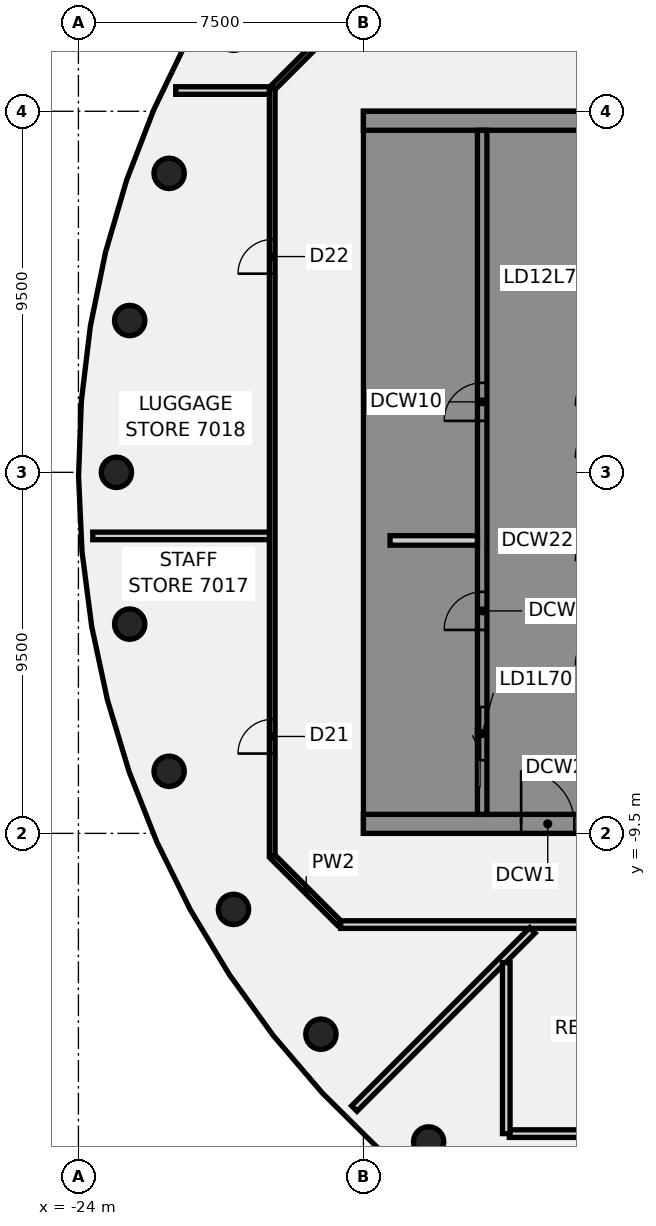
"""IFC4 building model, lengths in metres.
Left out: names, types, materials, properties, quantities, classifications, styles, units other than length and angle.
Written with IfcOpenShell. Run it as: python <this file> out.ifc"""

import sys

from ifc_helpers import new_model, si_unit, direction, frame, frame_2d, origin, origin_2d, place, context, subcontext, project, spatial, polyline, rectangle, circle, outline, extrude, element, fill, save


model = new_model("IFC4")
c1 = context("Model", 3, precision=1e-05, world=origin(), true_north=direction((0.0, 1.0)))
c2 = subcontext(c1, "Body", "Model", "MODEL_VIEW")
j1 = project(units=[si_unit("LENGTHUNIT", "METRE"), si_unit("PLANEANGLEUNIT", "RADIAN")], contexts=[c1])
p1 = place(None, origin())
s1 = spatial("IfcSite", under=j1, at=p1, CompositionType="ELEMENT")
p2 = place(p1, origin())
s2 = spatial("IfcBuilding", under=s1, at=p2, CompositionType="ELEMENT")
p3 = place(p2, frame((0.0, 0.0, 274.8)))
s3 = spatial("IfcBuildingStorey", under=s2, at=p3, CompositionType="ELEMENT", Elevation=274.8)
for number, where, z_axis, x_axis in (
    (1, (-21.613, 7.866, -0.14), (0.0, 0.0, 1.0), (1.0, 0.0, 0.0)),
    (2, (-22.651, 3.994, -0.14), (0.0, 0.0, 1.0), (1.0, 0.0, 0.0)),
    (3, (-23.0, 0.0, -0.14), (0.0, 0.0, 1.0), (1.0, 0.0, 0.0)),
    (4, (-22.651, -3.994, -0.14), (0.0, 0.0, 1.0), (1.0, 0.0, 0.0)),
    (5, (-21.613, -7.866, -0.14), (0.0, 0.0, 1.0), (1.0, 0.0, 0.0)),
    (6, (-19.919, -11.5, -0.14), (0.0, 0.0, 1.0), (1.0, 0.0, 0.0)),
    (7, (-17.619, -14.784, -0.14), (0.0, 0.0, 1.0), (1.0, 0.0, 0.0)),
    (8, (-14.784, -17.619, -0.14), (0.0, 0.0, 1.0), (1.0, 0.0, 0.0)),
):
    element("IfcColumn", number, at=place(p3, frame(where, z_axis=z_axis, x_axis=x_axis)), inside=s3, PredefinedType="COLUMN", context=c2, shape_type="SweptSolid", body=[
        extrude(circle(Radius=0.4, at=origin_2d()), origin(), (0.0, 0.0, 1.0), 3.56),
    ])
p4 = place(p3, frame((-18.872, -10.128, 0.0), z_axis=(0.0, 0.0, 1.0), x_axis=(0.707106781187, -0.707106781187, 0.0)))
e9 = element("IfcWall", 9, at=p4, inside=s3, PredefinedType="PARTITIONING", context=c2, shape_type="SweptSolid", body=[
    extrude(rectangle(XDim=2.455, YDim=0.15, at=frame_2d((1.228, 0.0))), origin(), (0.0, 0.0, 1.0), 2.824),
])
p5 = place(p3, frame((-23.623, -1.673, 0.0), z_axis=(0.0, 0.0, 1.0), x_axis=(1.0, 0.0, 0.0)))
e10 = element("IfcWall", 10, at=p5, inside=s3, PredefinedType="PARTITIONING", context=c2, shape_type="SweptSolid", body=[
    extrude(rectangle(XDim=4.668, YDim=0.2, at=frame_2d((2.334, 0.0))), origin(), (0.0, 0.0, 1.0), 2.824),
])
p6 = place(p3, frame((-21.439, 10.046, 0.0), z_axis=(0.0, 0.0, 1.0), x_axis=(1.0, 0.0, 0.0)))
e11 = element("IfcWall", 11, at=p6, inside=s3, PredefinedType="PARTITIONING", context=c2, shape_type="SweptSolid", body=[
    extrude(rectangle(XDim=2.484, YDim=0.2, at=frame_2d((1.242, 0.0))), origin(), (0.0, 0.0, 1.0), 2.824),
])
p7 = place(p3, frame((-17.1, -11.9, 0.0), z_axis=(0.0, 0.0, 1.0), x_axis=(1.0, 0.0, 0.0)))
e12 = element("IfcWall", 12, at=p7, inside=s3, PredefinedType="PARTITIONING", context=c2, shape_type="SweptSolid", body=[
    extrude(rectangle(XDim=34.165, YDim=0.2, at=frame_2d((17.083, 0.0))), origin(), (0.0, 0.0, 1.0), 2.824),
])
p8 = place(p7, frame((7.75, 0.0, 0.0)))
e13 = element("IfcOpeningElement", 13, at=p8, cuts=e12, PredefinedType="OPENING", context=c2, shape_type="SweptSolid", body=[
    extrude(rectangle(XDim=0.9, YDim=2.1, at=frame_2d((0.45, 1.05))), frame((0.0, 0.11, 0.0), z_axis=(0.0, -1.0, 0.0), x_axis=(1.0, 0.0, 0.0)), (0.0, 0.0, 1.0), 0.22),
])
p9 = place(p7, frame((27.541, 0.0, 0.0)))
e14 = element("IfcOpeningElement", 14, at=p9, cuts=e12, PredefinedType="OPENING", context=c2, shape_type="SweptSolid", body=[
    extrude(rectangle(XDim=0.9, YDim=2.1, at=frame_2d((0.45, 1.05))), frame((0.0, 0.11, 0.0), z_axis=(0.0, -1.0, 0.0), x_axis=(1.0, 0.0, 0.0)), (0.0, 0.0, 1.0), 0.22),
])
p10 = place(p7, frame((16.809, 0.0, 0.0)))
e15 = element("IfcOpeningElement", 15, at=p10, cuts=e12, PredefinedType="OPENING", context=c2, shape_type="SweptSolid", body=[
    extrude(rectangle(XDim=1.8, YDim=2.1, at=frame_2d((0.9, 1.05))), frame((0.0, 0.11, 0.0), z_axis=(0.0, -1.0, 0.0), x_axis=(1.0, 0.0, 0.0)), (0.0, 0.0, 1.0), 0.22),
])
p11 = place(p7, frame((24.222, 0.0, 0.0)))
e16 = element("IfcOpeningElement", 16, at=p11, cuts=e12, PredefinedType="OPENING", context=c2, shape_type="SweptSolid", body=[
    extrude(rectangle(XDim=0.9, YDim=2.1, at=frame_2d((0.45, 1.05))), frame((0.0, 0.11, 0.0), z_axis=(0.0, -1.0, 0.0), x_axis=(1.0, 0.0, 0.0)), (0.0, 0.0, 1.0), 0.22),
])
p12 = place(p7, frame((31.7, 0.0, 0.0)))
e17 = element("IfcOpeningElement", 17, at=p12, cuts=e12, PredefinedType="OPENING", context=c2, shape_type="SweptSolid", body=[
    extrude(rectangle(XDim=0.9, YDim=2.1, at=frame_2d((0.45, 1.05))), frame((0.0, 0.11, 0.0), z_axis=(0.0, -1.0, 0.0), x_axis=(1.0, 0.0, 0.0)), (0.0, 0.0, 1.0), 0.22),
])
p13 = place(p3, frame((-12.661, -17.4, 0.0), z_axis=(0.0, 0.0, 1.0), x_axis=(1.0, 0.0, 0.0)))
e18 = element("IfcWall", 18, at=p13, inside=s3, PredefinedType="PARTITIONING", context=c2, shape_type="SweptSolid", body=[
    extrude(rectangle(XDim=8.835, YDim=0.2, at=frame_2d((4.417, 0.0))), origin(), (0.0, 0.0, 1.0), 2.824),
])
p14 = place(p3, frame((-18.886, 10.114, 0.0), z_axis=(0.0, 0.0, 1.0), x_axis=(0.707106781187, 0.707106781187, 0.0)))
e19 = element("IfcWall", 19, at=p14, inside=s3, PredefinedType="PARTITIONING", context=c2, shape_type="SweptSolid", body=[
    extrude(rectangle(XDim=2.526, YDim=0.15, at=frame_2d((1.263, 0.0))), origin(), (0.0, 0.0, 1.0), 2.824),
])
p15 = place(p3, frame((-16.74, -16.74, 0.0), z_axis=(0.0, 0.0, 1.0), x_axis=(0.707106781187, 0.707106781187, 0.0)))
e20 = element("IfcWall", 20, at=p15, inside=s3, PredefinedType="PARTITIONING", context=c2, shape_type="SweptSolid", body=[
    extrude(rectangle(XDim=6.631, YDim=0.2, at=frame_2d((3.315, 0.0))), origin(), (0.0, 0.0, 1.0), 2.824),
])
p16 = place(p3, frame((-18.9, -10.1, 0.0), z_axis=(0.0, 0.0, 1.0), x_axis=(0.0, 1.0, 0.0)))
e21 = element("IfcWall", 21, at=p16, inside=s3, PredefinedType="PARTITIONING", context=c2, shape_type="SweptSolid", body=[
    extrude(rectangle(XDim=20.2, YDim=0.15, at=frame_2d((10.1, 0.0))), origin(), (0.0, 0.0, 1.0), 2.824),
])
p17 = place(p16, frame((2.7, 0.0, 0.0)))
e22 = element("IfcOpeningElement", 22, at=p17, cuts=e21, PredefinedType="OPENING", context=c2, shape_type="SweptSolid", body=[
    extrude(rectangle(XDim=0.9, YDim=2.1, at=frame_2d((0.45, 1.05))), frame((0.0, 0.085, 0.0), z_axis=(0.0, -1.0, 0.0), x_axis=(1.0, 0.0, 0.0)), (0.0, 0.0, 1.0), 0.17),
])
p18 = place(p16, frame((15.327, 0.0, 0.0)))
e23 = element("IfcOpeningElement", 23, at=p18, cuts=e21, PredefinedType="OPENING", context=c2, shape_type="SweptSolid", body=[
    extrude(rectangle(XDim=0.9, YDim=2.1, at=frame_2d((0.45, 1.05))), frame((0.0, 0.085, 0.0), z_axis=(0.0, -1.0, 0.0), x_axis=(1.0, 0.0, 0.0)), (0.0, 0.0, 1.0), 0.17),
])
p19 = place(p3, frame((-12.741, -17.4, 0.0), z_axis=(0.0, 0.0, 1.0), x_axis=(0.0, 1.0, 0.0)))
e24 = element("IfcWall", 24, at=p19, inside=s3, PredefinedType="PARTITIONING", context=c2, shape_type="SweptSolid", body=[
    extrude(rectangle(XDim=4.499, YDim=0.2, at=frame_2d((2.25, 0.0))), origin(), (0.0, 0.0, 1.0), 2.824),
])
p20 = place(p3, frame((-16.5, -9.25, 0.0), z_axis=(0.0, 0.0, 1.0), x_axis=(1.0, 0.0, 0.0)))
e25 = element("IfcWall", 25, at=p20, inside=s3, PredefinedType="SHEAR", context=c2, shape_type="SweptSolid", body=[
    extrude(rectangle(XDim=13.0, YDim=0.5, at=frame_2d((6.5, 0.0))), origin(), (0.0, 0.0, 1.0), 3.42),
])
p21 = place(p20, frame((4.15, 0.0, 0.0)))
e26 = element("IfcOpeningElement", 26, at=p21, cuts=e25, PredefinedType="OPENING", context=c2, shape_type="SweptSolid", body=[
    extrude(rectangle(XDim=1.4, YDim=2.1, at=frame_2d((0.7, 1.05))), frame((0.0, 0.26, 0.0), z_axis=(0.0, -1.0, 0.0), x_axis=(1.0, 0.0, 0.0)), (0.0, 0.0, 1.0), 0.52),
])
p22 = place(p20, frame((10.125, 0.0, 0.0)))
e27 = element("IfcOpeningElement", 27, at=p22, cuts=e25, PredefinedType="OPENING", context=c2, shape_type="SweptSolid", body=[
    extrude(rectangle(XDim=1.4, YDim=2.1, at=frame_2d((0.7, 1.05))), frame((0.0, 0.26, 0.0), z_axis=(0.0, -1.0, 0.0), x_axis=(1.0, 0.0, 0.0)), (0.0, 0.0, 1.0), 0.52),
])
p23 = place(p3, origin())
e28 = element("IfcWall", 28, at=p23, inside=s3, PredefinedType="SHEAR", context=c2, shape_type="SweptSolid", body=[
    extrude(outline(polyline([(-13.5, -8.125), (-16.0, -8.125), (-16.0, -5.625), (-13.5, -5.625), (-13.5, -5.375), (-16.0, -5.375), (-16.0, 5.375), (-13.5, 5.375), (-13.5, 5.625), (-16.0, 5.625), (-16.0, 8.125), (-13.5, 8.125), (-13.5, 9.0), (-16.0, 9.0), (-16.5, 9.0), (-16.5, -9.0), (-16.0, -9.0), (-13.5, -9.0), (-13.5, -8.125)])), origin(), (0.0, 0.0, 1.0), 3.42),
])
p24 = place(p3, frame((-16.5, 9.25, 0.0), z_axis=(0.0, 0.0, 1.0), x_axis=(1.0, 0.0, 0.0)))
e29 = element("IfcWall", 29, at=p24, inside=s3, PredefinedType="SHEAR", context=c2, shape_type="SweptSolid", body=[
    extrude(rectangle(XDim=13.0, YDim=0.5, at=frame_2d((6.5, 0.0))), origin(), (0.0, 0.0, 1.0), 3.42),
])
p25 = place(p3, frame((-13.375, -9.0, 0.0), z_axis=(0.0, 0.0, 1.0), x_axis=(0.0, 1.0, 0.0)))
e30 = element("IfcWall", 30, at=p25, inside=s3, PredefinedType="SHEAR", context=c2, shape_type="SweptSolid", body=[
    extrude(rectangle(XDim=18.0, YDim=0.25, at=frame_2d((9.0, 0.0))), origin(), (0.0, 0.0, 1.0), 3.42),
])
p26 = place(p25, frame((1.425, 0.0, 0.0)))
e31 = element("IfcOpeningElement", 31, at=p26, cuts=e30, PredefinedType="OPENING", context=c2, shape_type="SweptSolid", body=[
    extrude(rectangle(XDim=1.4, YDim=2.1, at=frame_2d((0.7, 1.05))), frame((0.0, 0.135, 0.0), z_axis=(0.0, -1.0, 0.0), x_axis=(1.0, 0.0, 0.0)), (0.0, 0.0, 1.0), 0.27),
])
p27 = place(p25, frame((4.854, 0.0, 0.0)))
e32 = element("IfcOpeningElement", 32, at=p27, cuts=e30, PredefinedType="OPENING", context=c2, shape_type="SweptSolid", body=[
    extrude(rectangle(XDim=1.0, YDim=2.1, at=frame_2d((0.5, 1.05))), frame((0.0, 0.135, 0.0), z_axis=(0.0, -1.0, 0.0), x_axis=(1.0, 0.0, 0.0)), (0.0, 0.0, 1.0), 0.27),
])
p28 = place(p25, frame((10.354, 0.0, 0.0)))
e33 = element("IfcOpeningElement", 33, at=p28, cuts=e30, PredefinedType="OPENING", context=c2, shape_type="SweptSolid", body=[
    extrude(rectangle(XDim=1.0, YDim=2.1, at=frame_2d((0.5, 1.05))), frame((0.0, 0.135, 0.0), z_axis=(0.0, -1.0, 0.0), x_axis=(1.0, 0.0, 0.0)), (0.0, 0.0, 1.0), 0.27),
])
p29 = place(p3, frame((-15.8, -1.792, 0.0), z_axis=(0.0, 0.0, 1.0), x_axis=(1.0, 0.0, 0.0)))
e34 = element("IfcWall", 34, at=p29, inside=s3, PredefinedType="PARTITIONING", context=c2, shape_type="SweptSolid", body=[
    extrude(rectangle(XDim=2.3, YDim=0.25, at=frame_2d((1.15, 0.0))), origin(), (0.0, 0.0, 1.0), 3.42),
])
p30 = place(p17, origin())
e35 = element("IfcDoor", 35, at=p30, inside=s3, OperationType="SINGLE_SWING_RIGHT", PredefinedType="DOOR", context=c2, shape_type="SweptSolid", body=[
    extrude(rectangle(XDim=0.9, YDim=2.1, at=frame_2d((0.45, 1.05))), frame((0.0, 0.025, 0.0), z_axis=(0.0, -1.0, 0.0), x_axis=(1.0, 0.0, 0.0)), (0.0, 0.0, 1.0), 0.05),
])
fill(e22, e35)
p31 = place(p18, origin())
e36 = element("IfcDoor", 36, at=p31, inside=s3, OperationType="SINGLE_SWING_LEFT", PredefinedType="DOOR", context=c2, shape_type="SweptSolid", body=[
    extrude(rectangle(XDim=0.9, YDim=2.1, at=frame_2d((0.45, 1.05))), frame((0.0, 0.025, 0.0), z_axis=(0.0, -1.0, 0.0), x_axis=(1.0, 0.0, 0.0)), (0.0, 0.0, 1.0), 0.05),
])
fill(e23, e36)
p32 = place(p21, origin())
e37 = element("IfcDoor", 37, at=p32, inside=s3, OperationType="SINGLE_SWING_LEFT", PredefinedType="DOOR", context=c2, shape_type="SweptSolid", body=[
    extrude(rectangle(XDim=1.4, YDim=2.1, at=frame_2d((0.7, 1.05))), frame((0.0, 0.025, 0.0), z_axis=(0.0, -1.0, 0.0), x_axis=(1.0, 0.0, 0.0)), (0.0, 0.0, 1.0), 0.05),
])
fill(e26, e37)
p33 = place(p26, origin())
e38 = element("IfcDoor", 38, at=p33, inside=s3, OperationType="SLIDING_TO_LEFT", PredefinedType="DOOR", context=c2, shape_type="SweptSolid", body=[
    extrude(rectangle(XDim=1.4, YDim=2.1, at=frame_2d((0.7, 1.05))), frame((0.0, 0.025, 0.0), z_axis=(0.0, -1.0, 0.0), x_axis=(1.0, 0.0, 0.0)), (0.0, 0.0, 1.0), 0.05),
])
fill(e31, e38)
p34 = place(p27, origin())
e39 = element("IfcDoor", 39, at=p34, inside=s3, OperationType="SINGLE_SWING_LEFT", PredefinedType="DOOR", context=c2, shape_type="SweptSolid", body=[
    extrude(rectangle(XDim=1.0, YDim=2.1, at=frame_2d((0.5, 1.05))), frame((0.0, 0.025, 0.0), z_axis=(0.0, -1.0, 0.0), x_axis=(1.0, 0.0, 0.0)), (0.0, 0.0, 1.0), 0.05),
])
fill(e32, e39)
p35 = place(p28, origin())
e40 = element("IfcDoor", 40, at=p35, inside=s3, OperationType="SINGLE_SWING_LEFT", PredefinedType="DOOR", context=c2, shape_type="SweptSolid", body=[
    extrude(rectangle(XDim=1.0, YDim=2.1, at=frame_2d((0.5, 1.05))), frame((0.0, 0.025, 0.0), z_axis=(0.0, -1.0, 0.0), x_axis=(1.0, 0.0, 0.0)), (0.0, 0.0, 1.0), 0.05),
])
fill(e33, e40)
save(model, sys.argv[1])
